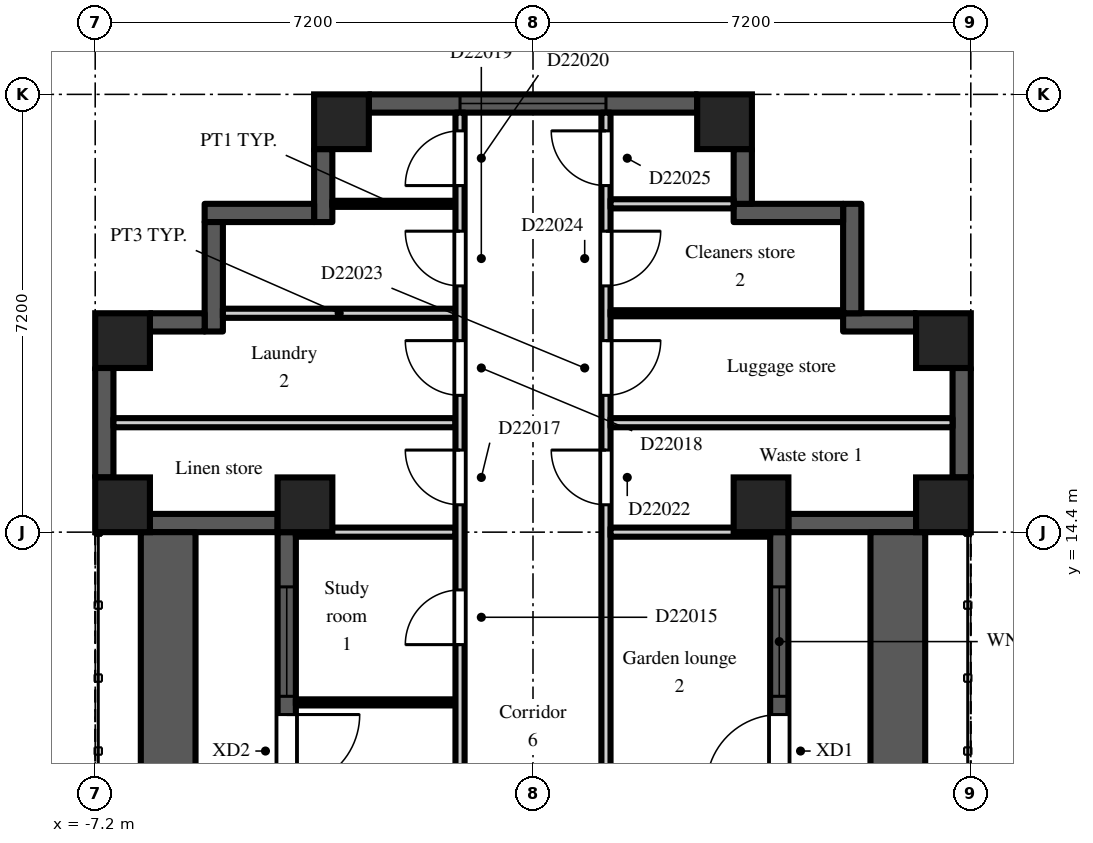
"""IFC4 building model, lengths in metres.
Left out: names, types, materials, properties, quantities, classifications, styles, units other than length and angle.
Written with IfcOpenShell. Run it as: python <this file> out.ifc"""

import sys

from ifc_helpers import new_model, si_unit, direction, frame, frame_2d, origin, origin_2d, place, context, subcontext, project, spatial, rectangle, extrude, element, fill, save


model = new_model("IFC4")
c1 = context("Model", 3, precision=1e-05, world=origin(), true_north=direction((0.0, 1.0)))
c2 = subcontext(c1, "Body", "Model", "MODEL_VIEW")
j1 = project(units=[si_unit("LENGTHUNIT", "METRE"), si_unit("PLANEANGLEUNIT", "RADIAN")], contexts=[c1])
p1 = place(None, origin())
s1 = spatial("IfcSite", under=j1, at=p1, CompositionType="ELEMENT")
p2 = place(p1, origin())
s2 = spatial("IfcBuilding", under=s1, at=p2, CompositionType="ELEMENT")
p3 = place(p2, frame((0.0, 0.0, 156.3)))
s3 = spatial("IfcBuildingStorey", under=s2, at=p3, CompositionType="ELEMENT", Elevation=156.3)
for number, where, z_axis, x_axis in (
    (1, (-6.75, 14.85, 0.0), (0.0, 0.0, 1.0), (1.0, 0.0, 0.0)),
    (2, (-6.75, 17.55, 0.0), (0.0, 0.0, 1.0), (1.0, 0.0, 0.0)),
    (3, (-3.75, 14.85, 0.0), (0.0, 0.0, 1.0), (1.0, 0.0, 0.0)),
    (4, (-3.15, 21.15, 0.0), (0.0, 0.0, 1.0), (1.0, 0.0, 0.0)),
    (5, (3.15, 21.15, 0.0), (0.0, 0.0, 1.0), (1.0, 0.0, 0.0)),
    (6, (3.75, 14.85, 0.0), (0.0, 0.0, 1.0), (1.0, 0.0, 0.0)),
    (7, (6.75, 14.85, 0.0), (0.0, 0.0, 1.0), (1.0, 0.0, 0.0)),
    (8, (6.75, 17.55, 0.0), (0.0, 0.0, 1.0), (1.0, 0.0, 0.0)),
):
    element("IfcColumn", number, at=place(p3, frame(where, z_axis=z_axis, x_axis=x_axis)), inside=s3, PredefinedType="COLUMN", context=c2, shape_type="SweptSolid", body=[
        extrude(rectangle(XDim=0.9, YDim=0.9, at=origin_2d()), origin(), (0.0, 0.0, 1.0), 3.0),
    ])
p4 = place(p3, frame((4.05, 7.2, 0.0), z_axis=(0.0, 0.0, 1.0), x_axis=(0.0, 1.0, 0.0)))
e9 = element("IfcWall", 9, at=p4, inside=s3, PredefinedType="SOLIDWALL", context=c2, shape_type="SweptSolid", body=[
    extrude(rectangle(XDim=7.2, YDim=0.3, at=frame_2d((3.6, 0.0))), origin(), (0.0, 0.0, 1.0), 2.2),
])
p5 = place(p4, frame((3.0, 0.0, 0.0)))
e10 = element("IfcOpeningElement", 10, at=p5, cuts=e9, PredefinedType="OPENING", context=c2, shape_type="SweptSolid", body=[
    extrude(rectangle(XDim=1.2, YDim=2.05, at=frame_2d((0.6, 1.025))), frame((0.0, 0.16, 0.0), z_axis=(0.0, -1.0, 0.0), x_axis=(1.0, 0.0, 0.0)), (0.0, 0.0, 1.0), 0.32),
])
p6 = place(p4, frame((0.9, 0.0, 0.2)))
e11 = element("IfcOpeningElement", 11, at=p6, cuts=e9, PredefinedType="OPENING", context=c2, shape_type="SweptSolid", body=[
    extrude(rectangle(XDim=1.8, YDim=1.85, at=frame_2d((0.9, 0.925))), frame((0.0, 0.16, 0.0), z_axis=(0.0, -1.0, 0.0), x_axis=(1.0, 0.0, 0.0)), (0.0, 0.0, 1.0), 0.32),
])
p7 = place(p4, frame((4.5, 0.0, 0.2)))
e12 = element("IfcOpeningElement", 12, at=p7, cuts=e9, PredefinedType="OPENING", context=c2, shape_type="SweptSolid", body=[
    extrude(rectangle(XDim=1.8, YDim=1.85, at=frame_2d((0.9, 0.925))), frame((0.0, 0.16, 0.0), z_axis=(0.0, -1.0, 0.0), x_axis=(1.0, 0.0, 0.0)), (0.0, 0.0, 1.0), 0.32),
])
p8 = place(p3, frame((4.2, 14.55, 0.0), z_axis=(0.0, 0.0, 1.0), x_axis=(1.0, 0.0, 0.0)))
e13 = element("IfcWall", 13, at=p8, inside=s3, PredefinedType="SOLIDWALL", context=c2, shape_type="SweptSolid", body=[
    extrude(rectangle(XDim=2.1, YDim=0.3, at=frame_2d((1.05, 0.0))), origin(), (0.0, 0.0, 1.0), 2.2),
])
p9 = place(p3, frame((7.05, 15.3, 0.0), z_axis=(0.0, 0.0, 1.0), x_axis=(0.0, 1.0, 0.0)))
e14 = element("IfcWall", 14, at=p9, inside=s3, PredefinedType="SOLIDWALL", context=c2, shape_type="SweptSolid", body=[
    extrude(rectangle(XDim=1.8, YDim=0.3, at=frame_2d((0.9, 0.0))), origin(), (0.0, 0.0, 1.0), 2.2),
])
p10 = place(p3, frame((6.3, 17.85, 0.0), z_axis=(0.0, 0.0, 1.0), x_axis=(-1.0, 0.0, 0.0)))
e15 = element("IfcWall", 15, at=p10, inside=s3, PredefinedType="SOLIDWALL", context=c2, shape_type="SweptSolid", body=[
    extrude(rectangle(XDim=1.2, YDim=0.3, at=frame_2d((0.6, 0.0))), origin(), (0.0, 0.0, 1.0), 2.6),
])
for number, where, z_axis, x_axis in (
    (16, (5.25, 18.0, 0.0), (0.0, 0.0, 1.0), (0.0, 1.0, 0.0)),
    (17, (5.1, 19.65, 0.0), (0.0, 0.0, 1.0), (-1.0, 0.0, 0.0)),
):
    element("IfcWall", number, at=place(p3, frame(where, z_axis=z_axis, x_axis=x_axis)), inside=s3, PredefinedType="SOLIDWALL", context=c2, shape_type="SweptSolid", body=[
        extrude(rectangle(XDim=1.8, YDim=0.3, at=frame_2d((0.9, 0.0))), origin(), (0.0, 0.0, 1.0), 2.6),
    ])
p11 = place(p3, frame((3.45, 19.8, 0.0), z_axis=(0.0, 0.0, 1.0), x_axis=(0.0, 1.0, 0.0)))
e18 = element("IfcWall", 18, at=p11, inside=s3, PredefinedType="SOLIDWALL", context=c2, shape_type="SweptSolid", body=[
    extrude(rectangle(XDim=0.9, YDim=0.3, at=frame_2d((0.45, 0.0))), origin(), (0.0, 0.0, 1.0), 2.6),
])
p12 = place(p3, frame((2.7, 21.45, 0.0), z_axis=(0.0, 0.0, 1.0), x_axis=(-1.0, 0.0, 0.0)))
e19 = element("IfcWall", 19, at=p12, inside=s3, PredefinedType="SOLIDWALL", context=c2, shape_type="SweptSolid", body=[
    extrude(rectangle(XDim=5.4, YDim=0.3, at=frame_2d((2.7, 0.0))), origin(), (0.0, 0.0, 1.0), 2.2),
])
p13 = place(p12, frame((1.5, 0.0, 0.2)))
e20 = element("IfcOpeningElement", 20, at=p13, cuts=e19, PredefinedType="OPENING", context=c2, shape_type="SweptSolid", body=[
    extrude(rectangle(XDim=2.4, YDim=1.85, at=frame_2d((1.2, 0.925))), frame((0.0, 0.16, 0.0), z_axis=(0.0, -1.0, 0.0), x_axis=(1.0, 0.0, 0.0)), (0.0, 0.0, 1.0), 0.32),
])
p14 = place(p3, frame((-3.45, 20.7, 0.0), z_axis=(0.0, 0.0, 1.0), x_axis=(0.0, -1.0, 0.0)))
e21 = element("IfcWall", 21, at=p14, inside=s3, PredefinedType="SOLIDWALL", context=c2, shape_type="SweptSolid", body=[
    extrude(rectangle(XDim=1.2, YDim=0.3, at=frame_2d((0.6, 0.0))), origin(), (0.0, 0.0, 1.0), 2.6),
])
p15 = place(p3, frame((-3.6, 19.65, 0.0), z_axis=(0.0, 0.0, 1.0), x_axis=(-1.0, 0.0, 0.0)))
e22 = element("IfcWall", 22, at=p15, inside=s3, PredefinedType="SOLIDWALL", context=c2, shape_type="SweptSolid", body=[
    extrude(rectangle(XDim=1.8, YDim=0.3, at=frame_2d((0.9, 0.0))), origin(), (0.0, 0.0, 1.0), 2.6),
])
p16 = place(p3, frame((-5.25, 19.5, 0.0), z_axis=(0.0, 0.0, 1.0), x_axis=(0.0, -1.0, 0.0)))
e23 = element("IfcWall", 23, at=p16, inside=s3, PredefinedType="SOLIDWALL", context=c2, shape_type="SweptSolid", body=[
    extrude(rectangle(XDim=1.8, YDim=0.3, at=frame_2d((0.9, 0.0))), origin(), (0.0, 0.0, 1.0), 2.6),
])
p17 = place(p3, frame((-5.4, 17.85, 0.0), z_axis=(0.0, 0.0, 1.0), x_axis=(-1.0, 0.0, 0.0)))
e24 = element("IfcWall", 24, at=p17, inside=s3, PredefinedType="SOLIDWALL", context=c2, shape_type="SweptSolid", body=[
    extrude(rectangle(XDim=0.9, YDim=0.3, at=frame_2d((0.45, 0.0))), origin(), (0.0, 0.0, 1.0), 2.6),
])
p18 = place(p3, frame((-7.05, 17.1, 0.0), z_axis=(0.0, 0.0, 1.0), x_axis=(0.0, -1.0, 0.0)))
e25 = element("IfcWall", 25, at=p18, inside=s3, PredefinedType="SOLIDWALL", context=c2, shape_type="SweptSolid", body=[
    extrude(rectangle(XDim=1.8, YDim=0.3, at=frame_2d((0.9, 0.0))), origin(), (0.0, 0.0, 1.0), 2.2),
])
p19 = place(p3, frame((-6.3, 14.55, 0.0), z_axis=(0.0, 0.0, 1.0), x_axis=(1.0, 0.0, 0.0)))
e26 = element("IfcWall", 26, at=p19, inside=s3, PredefinedType="SOLIDWALL", context=c2, shape_type="SweptSolid", body=[
    extrude(rectangle(XDim=2.1, YDim=0.3, at=frame_2d((1.05, 0.0))), origin(), (0.0, 0.0, 1.0), 2.2),
])
p20 = place(p3, frame((-4.05, 14.4, 0.0), z_axis=(0.0, 0.0, 1.0), x_axis=(0.0, -1.0, 0.0)))
e27 = element("IfcWall", 27, at=p20, inside=s3, PredefinedType="SOLIDWALL", context=c2, shape_type="SweptSolid", body=[
    extrude(rectangle(XDim=7.2, YDim=0.3, at=frame_2d((3.6, 0.0))), origin(), (0.0, 0.0, 1.0), 2.2),
])
p21 = place(p20, frame((3.0, 0.0, 0.0)))
e28 = element("IfcOpeningElement", 28, at=p21, cuts=e27, PredefinedType="OPENING", context=c2, shape_type="SweptSolid", body=[
    extrude(rectangle(XDim=1.2, YDim=2.05, at=frame_2d((0.6, 1.025))), frame((0.0, 0.16, 0.0), z_axis=(0.0, -1.0, 0.0), x_axis=(1.0, 0.0, 0.0)), (0.0, 0.0, 1.0), 0.32),
])
p22 = place(p20, frame((0.9, 0.0, 0.2)))
e29 = element("IfcOpeningElement", 29, at=p22, cuts=e27, PredefinedType="OPENING", context=c2, shape_type="SweptSolid", body=[
    extrude(rectangle(XDim=1.8, YDim=1.85, at=frame_2d((0.9, 0.925))), frame((0.0, 0.16, 0.0), z_axis=(0.0, -1.0, 0.0), x_axis=(1.0, 0.0, 0.0)), (0.0, 0.0, 1.0), 0.32),
])
p23 = place(p20, frame((4.5, 0.0, 0.2)))
e30 = element("IfcOpeningElement", 30, at=p23, cuts=e27, PredefinedType="OPENING", context=c2, shape_type="SweptSolid", body=[
    extrude(rectangle(XDim=1.8, YDim=1.85, at=frame_2d((0.9, 0.925))), frame((0.0, 0.16, 0.0), z_axis=(0.0, -1.0, 0.0), x_axis=(1.0, 0.0, 0.0)), (0.0, 0.0, 1.0), 0.32),
])
for number, where, z_axis, x_axis in (
    (31, (6.0, 7.2, 0.0), (0.0, 0.0, 1.0), (0.0, 1.0, 0.0)),
    (32, (-6.0, 7.2, 0.0), (0.0, 0.0, 1.0), (0.0, 1.0, 0.0)),
):
    element("IfcWall", number, at=place(p3, frame(where, z_axis=z_axis, x_axis=x_axis)), inside=s3, PredefinedType="PARAPET", context=c2, shape_type="SweptSolid", body=[
        extrude(rectangle(XDim=7.2, YDim=0.9, at=frame_2d((3.6, 0.0))), origin(), (0.0, 0.0, 1.0), 0.8),
    ])
p24 = place(p3, frame((-6.9, 16.2, 0.0), z_axis=(0.0, 0.0, 1.0), x_axis=(1.0, 0.0, 0.0)))
e33 = element("IfcWall", 33, at=p24, inside=s3, PredefinedType="PARTITIONING", context=c2, shape_type="SweptSolid", body=[
    extrude(rectangle(XDim=5.625, YDim=0.15, at=frame_2d((2.812, 0.0))), origin(), (0.0, 0.0, 1.0), 2.6),
])
p25 = place(p3, frame((-5.1, 18.0, 0.0), z_axis=(0.0, 0.0, 1.0), x_axis=(1.0, 0.0, 0.0)))
e34 = element("IfcWall", 34, at=p25, inside=s3, PredefinedType="PARTITIONING", context=c2, shape_type="SweptSolid", body=[
    extrude(rectangle(XDim=3.825, YDim=0.15, at=frame_2d((1.913, 0.0))), origin(), (0.0, 0.0, 1.0), 2.6),
])
p26 = place(p3, frame((-3.9, 11.6, 0.0), z_axis=(0.0, 0.0, 1.0), x_axis=(1.0, 0.0, 0.0)))
e35 = element("IfcWall", 35, at=p26, inside=s3, PredefinedType="PARTITIONING", context=c2, shape_type="SweptSolid", body=[
    extrude(rectangle(XDim=2.625, YDim=0.1, at=frame_2d((1.312, 0.0))), origin(), (0.0, 0.0, 1.0), 2.6),
])
p27 = place(p3, frame((-3.9, 14.4, 0.0), z_axis=(0.0, 0.0, 1.0), x_axis=(1.0, 0.0, 0.0)))
e36 = element("IfcWall", 36, at=p27, inside=s3, PredefinedType="PARTITIONING", context=c2, shape_type="SweptSolid", body=[
    extrude(rectangle(XDim=2.625, YDim=0.15, at=frame_2d((1.312, 0.0))), origin(), (0.0, 0.0, 1.0), 2.6),
])
p28 = place(p3, frame((-3.3, 19.8, 0.0), z_axis=(0.0, 0.0, 1.0), x_axis=(1.0, 0.0, 0.0)))
e37 = element("IfcWall", 37, at=p28, inside=s3, PredefinedType="PARTITIONING", context=c2, shape_type="SweptSolid", body=[
    extrude(rectangle(XDim=2.025, YDim=0.1, at=frame_2d((1.013, 0.0))), origin(), (0.0, 0.0, 1.0), 2.6),
])
p29 = place(p3, frame((-1.2, 7.275, 0.0), z_axis=(0.0, 0.0, 1.0), x_axis=(0.0, 1.0, 0.0)))
e38 = element("IfcWall", 38, at=p29, inside=s3, PredefinedType="PARTITIONING", context=c2, shape_type="SweptSolid", body=[
    extrude(rectangle(XDim=14.025, YDim=0.15, at=frame_2d((7.013, 0.0))), origin(), (0.0, 0.0, 1.0), 2.6),
])
p30 = place(p29, frame((5.275, 0.0, 0.0)))
e39 = element("IfcOpeningElement", 39, at=p30, cuts=e38, PredefinedType="OPENING", context=c2, shape_type="SweptSolid", body=[
    extrude(rectangle(XDim=0.9, YDim=2.1, at=frame_2d((0.45, 1.05))), frame((0.0, 0.085, 0.0), z_axis=(0.0, -1.0, 0.0), x_axis=(1.0, 0.0, 0.0)), (0.0, 0.0, 1.0), 0.17),
])
p31 = place(p29, frame((1.675, 0.0, 0.0)))
e40 = element("IfcOpeningElement", 40, at=p31, cuts=e38, PredefinedType="OPENING", context=c2, shape_type="SweptSolid", body=[
    extrude(rectangle(XDim=0.9, YDim=2.1, at=frame_2d((0.45, 1.05))), frame((0.0, 0.085, 0.0), z_axis=(0.0, -1.0, 0.0), x_axis=(1.0, 0.0, 0.0)), (0.0, 0.0, 1.0), 0.17),
])
p32 = place(p29, frame((7.575, 0.0, 0.0)))
e41 = element("IfcOpeningElement", 41, at=p32, cuts=e38, PredefinedType="OPENING", context=c2, shape_type="SweptSolid", body=[
    extrude(rectangle(XDim=0.9, YDim=2.1, at=frame_2d((0.45, 1.05))), frame((0.0, 0.085, 0.0), z_axis=(0.0, -1.0, 0.0), x_axis=(1.0, 0.0, 0.0)), (0.0, 0.0, 1.0), 0.17),
])
p33 = place(p29, frame((9.375, 0.0, 0.0)))
e42 = element("IfcOpeningElement", 42, at=p33, cuts=e38, PredefinedType="OPENING", context=c2, shape_type="SweptSolid", body=[
    extrude(rectangle(XDim=0.9, YDim=2.1, at=frame_2d((0.45, 1.05))), frame((0.0, 0.085, 0.0), z_axis=(0.0, -1.0, 0.0), x_axis=(1.0, 0.0, 0.0)), (0.0, 0.0, 1.0), 0.17),
])
p34 = place(p29, frame((11.175, 0.0, 0.0)))
e43 = element("IfcOpeningElement", 43, at=p34, cuts=e38, PredefinedType="OPENING", context=c2, shape_type="SweptSolid", body=[
    extrude(rectangle(XDim=0.9, YDim=2.1, at=frame_2d((0.45, 1.05))), frame((0.0, 0.085, 0.0), z_axis=(0.0, -1.0, 0.0), x_axis=(1.0, 0.0, 0.0)), (0.0, 0.0, 1.0), 0.17),
])
p35 = place(p29, frame((12.825, 0.0, 0.0)))
e44 = element("IfcOpeningElement", 44, at=p35, cuts=e38, PredefinedType="OPENING", context=c2, shape_type="SweptSolid", body=[
    extrude(rectangle(XDim=0.9, YDim=2.1, at=frame_2d((0.45, 1.05))), frame((0.0, 0.085, 0.0), z_axis=(0.0, -1.0, 0.0), x_axis=(1.0, 0.0, 0.0)), (0.0, 0.0, 1.0), 0.17),
])
p36 = place(p3, frame((1.2, 7.125, 0.0), z_axis=(0.0, 0.0, 1.0), x_axis=(0.0, 1.0, 0.0)))
e45 = element("IfcWall", 45, at=p36, inside=s3, PredefinedType="PARTITIONING", context=c2, shape_type="SweptSolid", body=[
    extrude(rectangle(XDim=14.175, YDim=0.15, at=frame_2d((7.087, 0.0))), origin(), (0.0, 0.0, 1.0), 2.6),
])
p37 = place(p36, frame((1.425, 0.0, 0.0)))
e46 = element("IfcOpeningElement", 46, at=p37, cuts=e45, PredefinedType="OPENING", context=c2, shape_type="SweptSolid", body=[
    extrude(rectangle(XDim=0.9, YDim=2.1, at=frame_2d((0.45, 1.05))), frame((0.0, 0.085, 0.0), z_axis=(0.0, -1.0, 0.0), x_axis=(1.0, 0.0, 0.0)), (0.0, 0.0, 1.0), 0.17),
])
p38 = place(p36, frame((7.725, 0.0, 0.0)))
e47 = element("IfcOpeningElement", 47, at=p38, cuts=e45, PredefinedType="OPENING", context=c2, shape_type="SweptSolid", body=[
    extrude(rectangle(XDim=0.9, YDim=2.1, at=frame_2d((0.45, 1.05))), frame((0.0, 0.085, 0.0), z_axis=(0.0, -1.0, 0.0), x_axis=(1.0, 0.0, 0.0)), (0.0, 0.0, 1.0), 0.17),
])
p39 = place(p36, frame((9.525, 0.0, 0.0)))
e48 = element("IfcOpeningElement", 48, at=p39, cuts=e45, PredefinedType="OPENING", context=c2, shape_type="SweptSolid", body=[
    extrude(rectangle(XDim=0.9, YDim=2.1, at=frame_2d((0.45, 1.05))), frame((0.0, 0.085, 0.0), z_axis=(0.0, -1.0, 0.0), x_axis=(1.0, 0.0, 0.0)), (0.0, 0.0, 1.0), 0.17),
])
p40 = place(p36, frame((11.325, 0.0, 0.0)))
e49 = element("IfcOpeningElement", 49, at=p40, cuts=e45, PredefinedType="OPENING", context=c2, shape_type="SweptSolid", body=[
    extrude(rectangle(XDim=0.9, YDim=2.1, at=frame_2d((0.45, 1.05))), frame((0.0, 0.085, 0.0), z_axis=(0.0, -1.0, 0.0), x_axis=(1.0, 0.0, 0.0)), (0.0, 0.0, 1.0), 0.17),
])
p41 = place(p36, frame((12.975, 0.0, 0.0)))
e50 = element("IfcOpeningElement", 50, at=p41, cuts=e45, PredefinedType="OPENING", context=c2, shape_type="SweptSolid", body=[
    extrude(rectangle(XDim=0.9, YDim=2.1, at=frame_2d((0.45, 1.05))), frame((0.0, 0.085, 0.0), z_axis=(0.0, -1.0, 0.0), x_axis=(1.0, 0.0, 0.0)), (0.0, 0.0, 1.0), 0.17),
])
p42 = place(p3, frame((1.275, 14.4, 0.0), z_axis=(0.0, 0.0, 1.0), x_axis=(1.0, 0.0, 0.0)))
e51 = element("IfcWall", 51, at=p42, inside=s3, PredefinedType="PARTITIONING", context=c2, shape_type="SweptSolid", body=[
    extrude(rectangle(XDim=2.625, YDim=0.15, at=frame_2d((1.312, 0.0))), origin(), (0.0, 0.0, 1.0), 2.6),
])
p43 = place(p3, frame((1.275, 16.2, 0.0), z_axis=(0.0, 0.0, 1.0), x_axis=(1.0, 0.0, 0.0)))
e52 = element("IfcWall", 52, at=p43, inside=s3, PredefinedType="PARTITIONING", context=c2, shape_type="SweptSolid", body=[
    extrude(rectangle(XDim=5.625, YDim=0.15, at=frame_2d((2.812, 0.0))), origin(), (0.0, 0.0, 1.0), 2.6),
])
p44 = place(p3, frame((1.275, 18.0, 0.0), z_axis=(0.0, 0.0, 1.0), x_axis=(1.0, 0.0, 0.0)))
e53 = element("IfcWall", 53, at=p44, inside=s3, PredefinedType="PARTITIONING", context=c2, shape_type="SweptSolid", body=[
    extrude(rectangle(XDim=3.825, YDim=0.1, at=frame_2d((1.913, 0.0))), origin(), (0.0, 0.0, 1.0), 2.6),
])
p45 = place(p3, frame((1.275, 19.8, 0.0), z_axis=(0.0, 0.0, 1.0), x_axis=(1.0, 0.0, 0.0)))
e54 = element("IfcWall", 54, at=p45, inside=s3, PredefinedType="PARTITIONING", context=c2, shape_type="SweptSolid", body=[
    extrude(rectangle(XDim=2.025, YDim=0.15, at=frame_2d((1.013, 0.0))), origin(), (0.0, 0.0, 1.0), 2.6),
])
p46 = place(p5, origin())
e55 = element("IfcDoor", 55, at=p46, inside=s3, OperationType="SINGLE_SWING_LEFT", PredefinedType="DOOR", context=c2, shape_type="SweptSolid", body=[
    extrude(rectangle(XDim=1.2, YDim=2.05, at=frame_2d((0.6, 1.025))), frame((0.0, 0.025, 0.0), z_axis=(0.0, -1.0, 0.0), x_axis=(1.0, 0.0, 0.0)), (0.0, 0.0, 1.0), 0.05),
])
fill(e10, e55)
p47 = place(p7, origin())
e56 = element("IfcWindow", 56, at=p47, inside=s3, PartitioningType="SINGLE_PANEL", PredefinedType="WINDOW", context=c2, shape_type="SweptSolid", body=[
    extrude(rectangle(XDim=1.8, YDim=1.85, at=frame_2d((0.9, 0.925))), frame((0.0, 0.03, 0.0), z_axis=(0.0, -1.0, 0.0), x_axis=(1.0, 0.0, 0.0)), (0.0, 0.0, 1.0), 0.06),
])
fill(e12, e56)
p48 = place(p13, origin())
e57 = element("IfcWindow", 57, at=p48, inside=s3, PartitioningType="SINGLE_PANEL", PredefinedType="WINDOW", context=c2, shape_type="SweptSolid", body=[
    extrude(rectangle(XDim=2.4, YDim=1.85, at=frame_2d((1.2, 0.925))), frame((0.0, 0.03, 0.0), z_axis=(0.0, -1.0, 0.0), x_axis=(1.0, 0.0, 0.0)), (0.0, 0.0, 1.0), 0.06),
])
fill(e20, e57)
p49 = place(p21, origin())
e58 = element("IfcDoor", 58, at=p49, inside=s3, OperationType="SINGLE_SWING_LEFT", PredefinedType="DOOR", context=c2, shape_type="SweptSolid", body=[
    extrude(rectangle(XDim=1.2, YDim=2.05, at=frame_2d((0.6, 1.025))), frame((0.0, 0.025, 0.0), z_axis=(0.0, -1.0, 0.0), x_axis=(1.0, 0.0, 0.0)), (0.0, 0.0, 1.0), 0.05),
])
fill(e28, e58)
p50 = place(p22, origin())
e59 = element("IfcWindow", 59, at=p50, inside=s3, PartitioningType="SINGLE_PANEL", PredefinedType="WINDOW", context=c2, shape_type="SweptSolid", body=[
    extrude(rectangle(XDim=1.8, YDim=1.85, at=frame_2d((0.9, 0.925))), frame((0.0, 0.03, 0.0), z_axis=(0.0, -1.0, 0.0), x_axis=(1.0, 0.0, 0.0)), (0.0, 0.0, 1.0), 0.06),
])
fill(e29, e59)
p51 = place(p30, origin())
e60 = element("IfcDoor", 60, at=p51, inside=s3, OperationType="SINGLE_SWING_LEFT", PredefinedType="DOOR", context=c2, shape_type="SweptSolid", body=[
    extrude(rectangle(XDim=0.9, YDim=2.1, at=frame_2d((0.45, 1.05))), frame((0.0, 0.025, 0.0), z_axis=(0.0, -1.0, 0.0), x_axis=(1.0, 0.0, 0.0)), (0.0, 0.0, 1.0), 0.05),
])
fill(e39, e60)
p52 = place(p32, origin())
e61 = element("IfcDoor", 61, at=p52, inside=s3, OperationType="SINGLE_SWING_RIGHT", PredefinedType="DOOR", context=c2, shape_type="SweptSolid", body=[
    extrude(rectangle(XDim=0.9, YDim=2.1, at=frame_2d((0.45, 1.05))), frame((0.0, 0.025, 0.0), z_axis=(0.0, -1.0, 0.0), x_axis=(1.0, 0.0, 0.0)), (0.0, 0.0, 1.0), 0.05),
])
fill(e41, e61)
p53 = place(p33, origin())
e62 = element("IfcDoor", 62, at=p53, inside=s3, OperationType="SINGLE_SWING_RIGHT", PredefinedType="DOOR", context=c2, shape_type="SweptSolid", body=[
    extrude(rectangle(XDim=0.9, YDim=2.1, at=frame_2d((0.45, 1.05))), frame((0.0, 0.025, 0.0), z_axis=(0.0, -1.0, 0.0), x_axis=(1.0, 0.0, 0.0)), (0.0, 0.0, 1.0), 0.05),
])
fill(e42, e62)
p54 = place(p34, origin())
e63 = element("IfcDoor", 63, at=p54, inside=s3, OperationType="SINGLE_SWING_RIGHT", PredefinedType="DOOR", context=c2, shape_type="SweptSolid", body=[
    extrude(rectangle(XDim=0.9, YDim=2.1, at=frame_2d((0.45, 1.05))), frame((0.0, 0.025, 0.0), z_axis=(0.0, -1.0, 0.0), x_axis=(1.0, 0.0, 0.0)), (0.0, 0.0, 1.0), 0.05),
])
fill(e43, e63)
p55 = place(p35, origin())
e64 = element("IfcDoor", 64, at=p55, inside=s3, OperationType="SINGLE_SWING_LEFT", PredefinedType="DOOR", context=c2, shape_type="SweptSolid", body=[
    extrude(rectangle(XDim=0.9, YDim=2.1, at=frame_2d((0.45, 1.05))), frame((0.0, 0.025, 0.0), z_axis=(0.0, -1.0, 0.0), x_axis=(1.0, 0.0, 0.0)), (0.0, 0.0, 1.0), 0.05),
])
fill(e44, e64)
p56 = place(p38, origin())
e65 = element("IfcDoor", 65, at=p56, inside=s3, OperationType="SINGLE_SWING_RIGHT", PredefinedType="DOOR", context=c2, shape_type="SweptSolid", body=[
    extrude(rectangle(XDim=0.9, YDim=2.1, at=frame_2d((0.45, 1.05))), frame((0.0, 0.025, 0.0), z_axis=(0.0, -1.0, 0.0), x_axis=(1.0, 0.0, 0.0)), (0.0, 0.0, 1.0), 0.05),
])
fill(e47, e65)
p57 = place(p39, frame((0.9, 0.0, 0.0), z_axis=(0.0, 0.0, 1.0), x_axis=(-1.0, 0.0, 0.0)))
e66 = element("IfcDoor", 66, at=p57, inside=s3, OperationType="SINGLE_SWING_LEFT", PredefinedType="DOOR", context=c2, shape_type="SweptSolid", body=[
    extrude(rectangle(XDim=0.9, YDim=2.1, at=frame_2d((0.45, 1.05))), frame((0.0, 0.025, 0.0), z_axis=(0.0, -1.0, 0.0), x_axis=(1.0, 0.0, 0.0)), (0.0, 0.0, 1.0), 0.05),
])
fill(e48, e66)
p58 = place(p40, frame((0.9, 0.0, 0.0), z_axis=(0.0, 0.0, 1.0), x_axis=(-1.0, 0.0, 0.0)))
e67 = element("IfcDoor", 67, at=p58, inside=s3, OperationType="SINGLE_SWING_LEFT", PredefinedType="DOOR", context=c2, shape_type="SweptSolid", body=[
    extrude(rectangle(XDim=0.9, YDim=2.1, at=frame_2d((0.45, 1.05))), frame((0.0, 0.025, 0.0), z_axis=(0.0, -1.0, 0.0), x_axis=(1.0, 0.0, 0.0)), (0.0, 0.0, 1.0), 0.05),
])
fill(e49, e67)
p59 = place(p41, origin())
e68 = element("IfcDoor", 68, at=p59, inside=s3, OperationType="SINGLE_SWING_RIGHT", PredefinedType="DOOR", context=c2, shape_type="SweptSolid", body=[
    extrude(rectangle(XDim=0.9, YDim=2.1, at=frame_2d((0.45, 1.05))), frame((0.0, 0.025, 0.0), z_axis=(0.0, -1.0, 0.0), x_axis=(1.0, 0.0, 0.0)), (0.0, 0.0, 1.0), 0.05),
])
fill(e50, e68)
save(model, sys.argv[1])
